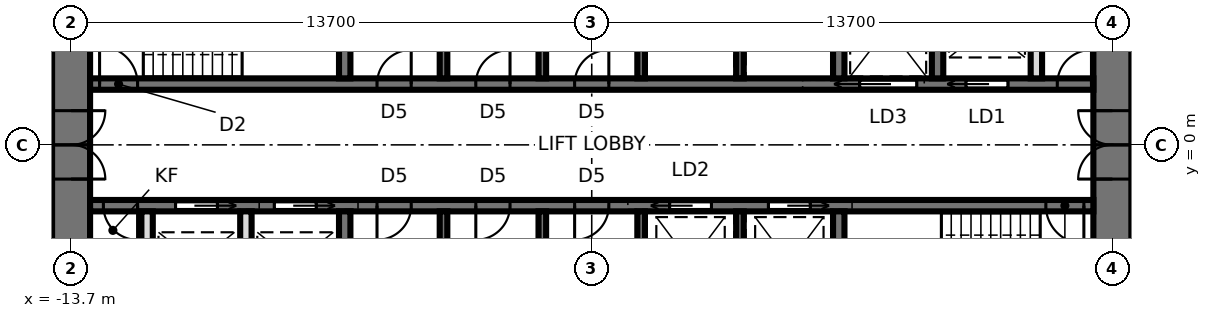
"""IFC4 building model, lengths in metres.
Left out: names, types, materials, properties, quantities, classifications, styles, units other than length and angle.
Written with IfcOpenShell. Run it as: python <this file> out.ifc"""

import sys

from ifc_helpers import new_model, si_unit, direction, frame, frame_2d, origin, place, context, subcontext, project, spatial, rectangle, extrude, element, fill, save


model = new_model("IFC4")
c1 = context("Model", 3, precision=1e-05, world=origin(), true_north=direction((0.0, 1.0)))
c2 = subcontext(c1, "Body", "Model", "MODEL_VIEW")
j1 = project(units=[si_unit("LENGTHUNIT", "METRE"), si_unit("PLANEANGLEUNIT", "RADIAN")], contexts=[c1])
p1 = place(None, origin())
s1 = spatial("IfcSite", under=j1, at=p1, CompositionType="ELEMENT")
p2 = place(p1, origin())
s2 = spatial("IfcBuilding", under=s1, at=p2, CompositionType="ELEMENT")
p3 = place(p2, frame((0.0, 0.0, 195.5)))
s3 = spatial("IfcBuildingStorey", under=s2, at=p3, CompositionType="ELEMENT", Elevation=195.5)
p4 = place(p3, frame((13.7, -9.5, 0.0), z_axis=(0.0, 0.0, 1.0), x_axis=(0.0, 1.0, 0.0)))
e1 = element("IfcWall", 1, at=p4, inside=s3, PredefinedType="SHEAR", context=c2, shape_type="SweptSolid", body=[
    extrude(rectangle(XDim=19.0, YDim=1.0, at=frame_2d((9.5, 0.0))), origin(), (0.0, 0.0, 1.0), 3.9),
])
p5 = place(p4, frame((8.6, 0.0, 0.0)))
e2 = element("IfcOpeningElement", 2, at=p5, cuts=e1, PredefinedType="OPENING", context=c2, shape_type="SweptSolid", body=[
    extrude(rectangle(XDim=1.8, YDim=2.4, at=frame_2d((0.9, 1.2))), frame((0.0, 0.51, 0.0), z_axis=(0.0, -1.0, 0.0), x_axis=(1.0, 0.0, 0.0)), (0.0, 0.0, 1.0), 1.02),
])
p6 = place(p3, frame((-13.7, 9.5, 0.0), z_axis=(0.0, 0.0, 1.0), x_axis=(0.0, -1.0, 0.0)))
e3 = element("IfcWall", 3, at=p6, inside=s3, PredefinedType="SHEAR", context=c2, shape_type="SweptSolid", body=[
    extrude(rectangle(XDim=19.0, YDim=1.0, at=frame_2d((9.5, 0.0))), origin(), (0.0, 0.0, 1.0), 3.9),
])
p7 = place(p6, frame((8.6, 0.0, 0.0)))
e4 = element("IfcOpeningElement", 4, at=p7, cuts=e3, PredefinedType="OPENING", context=c2, shape_type="SweptSolid", body=[
    extrude(rectangle(XDim=1.8, YDim=2.4, at=frame_2d((0.9, 1.2))), frame((0.0, 0.51, 0.0), z_axis=(0.0, -1.0, 0.0), x_axis=(1.0, 0.0, 0.0)), (0.0, 0.0, 1.0), 1.02),
])
p8 = place(p3, frame((-13.2, 1.6, 0.0), z_axis=(0.0, 0.0, 1.0), x_axis=(1.0, 0.0, 0.0)))
e5 = element("IfcWall", 5, at=p8, inside=s3, PredefinedType="SHEAR", context=c2, shape_type="SweptSolid", body=[
    extrude(rectangle(XDim=26.4, YDim=0.3, at=frame_2d((13.2, 0.0))), origin(), (0.0, 0.0, 1.0), 3.9),
])
p9 = place(p8, frame((0.25, 0.0, 0.0)))
e6 = element("IfcOpeningElement", 6, at=p9, cuts=e5, PredefinedType="OPENING", context=c2, shape_type="SweptSolid", body=[
    extrude(rectangle(XDim=1.0, YDim=2.1, at=frame_2d((0.5, 1.05))), frame((0.0, 0.16, 0.0), z_axis=(0.0, -1.0, 0.0), x_axis=(1.0, 0.0, 0.0)), (0.0, 0.0, 1.0), 0.32),
])
p10 = place(p8, frame((23.05, 0.0, 0.0)))
e7 = element("IfcOpeningElement", 7, at=p10, cuts=e5, PredefinedType="OPENING", context=c2, shape_type="SweptSolid", body=[
    extrude(rectangle(XDim=1.1, YDim=2.3, at=frame_2d((0.55, 1.15))), frame((0.0, 0.16, 0.0), z_axis=(0.0, -1.0, 0.0), x_axis=(1.0, 0.0, 0.0)), (0.0, 0.0, 1.0), 0.32),
])
p11 = place(p8, frame((20.25, 0.0, 0.0)))
e8 = element("IfcOpeningElement", 8, at=p11, cuts=e5, PredefinedType="OPENING", context=c2, shape_type="SweptSolid", body=[
    extrude(rectangle(XDim=1.5, YDim=2.4, at=frame_2d((0.75, 1.2))), frame((0.0, 0.16, 0.0), z_axis=(0.0, -1.0, 0.0), x_axis=(1.0, 0.0, 0.0)), (0.0, 0.0, 1.0), 0.32),
])
p12 = place(p8, frame((7.55, 0.0, 0.0)))
e9 = element("IfcOpeningElement", 9, at=p12, cuts=e5, PredefinedType="OPENING", context=c2, shape_type="SweptSolid", body=[
    extrude(rectangle(XDim=0.9, YDim=2.1, at=frame_2d((0.45, 1.05))), frame((0.0, 0.16, 0.0), z_axis=(0.0, -1.0, 0.0), x_axis=(1.0, 0.0, 0.0)), (0.0, 0.0, 1.0), 0.32),
])
p13 = place(p8, frame((10.15, 0.0, 0.0)))
e10 = element("IfcOpeningElement", 10, at=p13, cuts=e5, PredefinedType="OPENING", context=c2, shape_type="SweptSolid", body=[
    extrude(rectangle(XDim=0.9, YDim=2.1, at=frame_2d((0.45, 1.05))), frame((0.0, 0.16, 0.0), z_axis=(0.0, -1.0, 0.0), x_axis=(1.0, 0.0, 0.0)), (0.0, 0.0, 1.0), 0.32),
])
p14 = place(p8, frame((12.75, 0.0, 0.0)))
e11 = element("IfcOpeningElement", 11, at=p14, cuts=e5, PredefinedType="OPENING", context=c2, shape_type="SweptSolid", body=[
    extrude(rectangle(XDim=0.9, YDim=2.1, at=frame_2d((0.45, 1.05))), frame((0.0, 0.16, 0.0), z_axis=(0.0, -1.0, 0.0), x_axis=(1.0, 0.0, 0.0)), (0.0, 0.0, 1.0), 0.32),
])
p15 = place(p8, frame((25.45, 0.0, 0.0)))
e12 = element("IfcOpeningElement", 12, at=p15, cuts=e5, PredefinedType="OPENING", context=c2, shape_type="SweptSolid", body=[
    extrude(rectangle(XDim=0.9, YDim=2.1, at=frame_2d((0.45, 1.05))), frame((0.0, 0.16, 0.0), z_axis=(0.0, -1.0, 0.0), x_axis=(1.0, 0.0, 0.0)), (0.0, 0.0, 1.0), 0.32),
])
p16 = place(p3, frame((-13.2, -1.6, 0.0), z_axis=(0.0, 0.0, 1.0), x_axis=(1.0, 0.0, 0.0)))
e13 = element("IfcWall", 13, at=p16, inside=s3, PredefinedType="SHEAR", context=c2, shape_type="SweptSolid", body=[
    extrude(rectangle(XDim=26.4, YDim=0.3, at=frame_2d((13.2, 0.0))), origin(), (0.0, 0.0, 1.0), 3.9),
])
p17 = place(p16, frame((25.15, 0.0, 0.0)))
e14 = element("IfcOpeningElement", 14, at=p17, cuts=e13, PredefinedType="OPENING", context=c2, shape_type="SweptSolid", body=[
    extrude(rectangle(XDim=1.0, YDim=2.1, at=frame_2d((0.5, 1.05))), frame((0.0, 0.16, 0.0), z_axis=(0.0, -1.0, 0.0), x_axis=(1.0, 0.0, 0.0)), (0.0, 0.0, 1.0), 0.32),
])
p18 = place(p16, frame((7.55, 0.0, 0.0)))
e15 = element("IfcOpeningElement", 15, at=p18, cuts=e13, PredefinedType="OPENING", context=c2, shape_type="SweptSolid", body=[
    extrude(rectangle(XDim=0.9, YDim=2.1, at=frame_2d((0.45, 1.05))), frame((0.0, 0.16, 0.0), z_axis=(0.0, -1.0, 0.0), x_axis=(1.0, 0.0, 0.0)), (0.0, 0.0, 1.0), 0.32),
])
p19 = place(p16, frame((10.15, 0.0, 0.0)))
e16 = element("IfcOpeningElement", 16, at=p19, cuts=e13, PredefinedType="OPENING", context=c2, shape_type="SweptSolid", body=[
    extrude(rectangle(XDim=0.9, YDim=2.1, at=frame_2d((0.45, 1.05))), frame((0.0, 0.16, 0.0), z_axis=(0.0, -1.0, 0.0), x_axis=(1.0, 0.0, 0.0)), (0.0, 0.0, 1.0), 0.32),
])
p20 = place(p16, frame((12.75, 0.0, 0.0)))
e17 = element("IfcOpeningElement", 17, at=p20, cuts=e13, PredefinedType="OPENING", context=c2, shape_type="SweptSolid", body=[
    extrude(rectangle(XDim=0.9, YDim=2.1, at=frame_2d((0.45, 1.05))), frame((0.0, 0.16, 0.0), z_axis=(0.0, -1.0, 0.0), x_axis=(1.0, 0.0, 0.0)), (0.0, 0.0, 1.0), 0.32),
])
p21 = place(p16, frame((15.25, 0.0, 0.0)))
e18 = element("IfcOpeningElement", 18, at=p21, cuts=e13, PredefinedType="OPENING", context=c2, shape_type="SweptSolid", body=[
    extrude(rectangle(XDim=1.1, YDim=2.3, at=frame_2d((0.55, 1.15))), frame((0.0, 0.16, 0.0), z_axis=(0.0, -1.0, 0.0), x_axis=(1.0, 0.0, 0.0)), (0.0, 0.0, 1.0), 0.32),
])
p22 = place(p16, frame((17.85, 0.0, 0.0)))
e19 = element("IfcOpeningElement", 19, at=p22, cuts=e13, PredefinedType="OPENING", context=c2, shape_type="SweptSolid", body=[
    extrude(rectangle(XDim=1.1, YDim=2.3, at=frame_2d((0.55, 1.15))), frame((0.0, 0.16, 0.0), z_axis=(0.0, -1.0, 0.0), x_axis=(1.0, 0.0, 0.0)), (0.0, 0.0, 1.0), 0.32),
])
p23 = place(p16, frame((4.85, 0.0, 0.0)))
e20 = element("IfcOpeningElement", 20, at=p23, cuts=e13, PredefinedType="OPENING", context=c2, shape_type="SweptSolid", body=[
    extrude(rectangle(XDim=1.1, YDim=2.3, at=frame_2d((0.55, 1.15))), frame((0.0, 0.16, 0.0), z_axis=(0.0, -1.0, 0.0), x_axis=(1.0, 0.0, 0.0)), (0.0, 0.0, 1.0), 0.32),
])
p24 = place(p16, frame((2.25, 0.0, 0.0)))
e21 = element("IfcOpeningElement", 21, at=p24, cuts=e13, PredefinedType="OPENING", context=c2, shape_type="SweptSolid", body=[
    extrude(rectangle(XDim=1.1, YDim=2.3, at=frame_2d((0.55, 1.15))), frame((0.0, 0.16, 0.0), z_axis=(0.0, -1.0, 0.0), x_axis=(1.0, 0.0, 0.0)), (0.0, 0.0, 1.0), 0.32),
])
p25 = place(p16, frame((0.35, 0.0, 0.0)))
e22 = element("IfcOpeningElement", 22, at=p25, cuts=e13, PredefinedType="OPENING", context=c2, shape_type="SweptSolid", body=[
    extrude(rectangle(XDim=0.9, YDim=2.1, at=frame_2d((0.45, 1.05))), frame((0.0, 0.16, 0.0), z_axis=(0.0, -1.0, 0.0), x_axis=(1.0, 0.0, 0.0)), (0.0, 0.0, 1.0), 0.32),
])
for number, where, z_axis, x_axis in (
    (23, (-6.5, 1.75, 0.0), (0.0, 0.0, 1.0), (0.0, 1.0, 0.0)),
    (24, (6.5, 1.75, 0.0), (0.0, 0.0, 1.0), (0.0, 1.0, 0.0)),
):
    element("IfcWall", number, at=place(p3, frame(where, z_axis=z_axis, x_axis=x_axis)), inside=s3, PredefinedType="SHEAR", context=c2, shape_type="SweptSolid", body=[
        extrude(rectangle(XDim=2.7, YDim=0.3, at=frame_2d((1.35, 0.0))), origin(), (0.0, 0.0, 1.0), 3.9),
    ])
for number, where, z_axis, x_axis in (
    (25, (-3.9, 1.75, 0.0), (0.0, 0.0, 1.0), (0.0, 1.0, 0.0)),
    (26, (-1.3, 1.75, 0.0), (0.0, 0.0, 1.0), (0.0, 1.0, 0.0)),
    (27, (1.3, 1.75, 0.0), (0.0, 0.0, 1.0), (0.0, 1.0, 0.0)),
    (28, (3.9, 1.75, 0.0), (0.0, 0.0, 1.0), (0.0, 1.0, 0.0)),
):
    element("IfcWall", number, at=place(p3, frame(where, z_axis=z_axis, x_axis=x_axis)), inside=s3, PredefinedType="SHEAR", context=c2, shape_type="SweptSolid", body=[
        extrude(rectangle(XDim=2.7, YDim=0.2, at=frame_2d((1.35, 0.0))), origin(), (0.0, 0.0, 1.0), 3.9),
    ])
for number, where, z_axis, x_axis in (
    (29, (-6.5, -1.75, 0.0), (0.0, 0.0, 1.0), (0.0, -1.0, 0.0)),
    (30, (6.5, -1.75, 0.0), (0.0, 0.0, 1.0), (0.0, -1.0, 0.0)),
):
    element("IfcWall", number, at=place(p3, frame(where, z_axis=z_axis, x_axis=x_axis)), inside=s3, PredefinedType="SHEAR", context=c2, shape_type="SweptSolid", body=[
        extrude(rectangle(XDim=2.7, YDim=0.3, at=frame_2d((1.35, 0.0))), origin(), (0.0, 0.0, 1.0), 3.9),
    ])
for number, where, z_axis, x_axis in (
    (31, (-3.9, -1.75, 0.0), (0.0, 0.0, 1.0), (0.0, -1.0, 0.0)),
    (32, (-1.3, -1.75, 0.0), (0.0, 0.0, 1.0), (0.0, -1.0, 0.0)),
    (33, (1.3, -1.75, 0.0), (0.0, 0.0, 1.0), (0.0, -1.0, 0.0)),
    (34, (3.9, -1.75, 0.0), (0.0, 0.0, 1.0), (0.0, -1.0, 0.0)),
):
    element("IfcWall", number, at=place(p3, frame(where, z_axis=z_axis, x_axis=x_axis)), inside=s3, PredefinedType="SHEAR", context=c2, shape_type="SweptSolid", body=[
        extrude(rectangle(XDim=2.7, YDim=0.2, at=frame_2d((1.35, 0.0))), origin(), (0.0, 0.0, 1.0), 3.9),
    ])
p26 = place(p3, frame((9.1, 1.75, 0.0), z_axis=(0.0, 0.0, 1.0), x_axis=(0.0, 1.0, 0.0)))
e35 = element("IfcWall", 35, at=p26, inside=s3, PredefinedType="SHEAR", context=c2, shape_type="SweptSolid", body=[
    extrude(rectangle(XDim=2.7, YDim=0.3, at=frame_2d((1.35, 0.0))), origin(), (0.0, 0.0, 1.0), 3.9),
])
for number, where, z_axis, x_axis in (
    (36, (-9.1, -1.75, 0.0), (0.0, 0.0, 1.0), (0.0, -1.0, 0.0)),
    (37, (-11.7, -1.75, 0.0), (0.0, 0.0, 1.0), (0.0, -1.0, 0.0)),
    (38, (11.7, 1.75, 0.0), (0.0, 0.0, 1.0), (0.0, 1.0, 0.0)),
):
    element("IfcWall", number, at=place(p3, frame(where, z_axis=z_axis, x_axis=x_axis)), inside=s3, PredefinedType="SOLIDWALL", context=c2, shape_type="SweptSolid", body=[
        extrude(rectangle(XDim=2.7, YDim=0.3, at=frame_2d((1.35, 0.0))), origin(), (0.0, 0.0, 1.0), 3.74),
    ])
p27 = place(p7, origin())
e39 = element("IfcDoor", 39, at=p27, inside=s3, OperationType="DOUBLE_DOOR_SINGLE_SWING", PredefinedType="DOOR", context=c2, shape_type="SweptSolid", body=[
    extrude(rectangle(XDim=1.72, YDim=2.36, at=frame_2d((0.9, 1.18))), frame((0.0, 0.025, 0.0), z_axis=(0.0, -1.0, 0.0), x_axis=(1.0, 0.0, 0.0)), (0.0, 0.0, 1.0), 0.05),
    extrude(rectangle(XDim=0.04, YDim=2.4, at=frame_2d((0.02, 1.2))), frame((0.0, 0.25, 0.0), z_axis=(0.0, -1.0, 0.0), x_axis=(1.0, 0.0, 0.0)), (0.0, 0.0, 1.0), 0.5),
    extrude(rectangle(XDim=0.04, YDim=2.4, at=frame_2d((1.78, 1.2))), frame((0.0, 0.25, 0.0), z_axis=(0.0, -1.0, 0.0), x_axis=(1.0, 0.0, 0.0)), (0.0, 0.0, 1.0), 0.5),
    extrude(rectangle(XDim=1.72, YDim=0.04, at=frame_2d((0.9, 2.38))), frame((0.0, 0.25, 0.0), z_axis=(0.0, -1.0, 0.0), x_axis=(1.0, 0.0, 0.0)), (0.0, 0.0, 1.0), 0.5),
])
fill(e4, e39)
p28 = place(p5, origin())
e40 = element("IfcDoor", 40, at=p28, inside=s3, OperationType="DOUBLE_DOOR_SINGLE_SWING", PredefinedType="DOOR", context=c2, shape_type="SweptSolid", body=[
    extrude(rectangle(XDim=1.72, YDim=2.36, at=frame_2d((0.9, 1.18))), frame((0.0, 0.025, 0.0), z_axis=(0.0, -1.0, 0.0), x_axis=(1.0, 0.0, 0.0)), (0.0, 0.0, 1.0), 0.05),
    extrude(rectangle(XDim=0.04, YDim=2.4, at=frame_2d((0.02, 1.2))), frame((0.0, 0.25, 0.0), z_axis=(0.0, -1.0, 0.0), x_axis=(1.0, 0.0, 0.0)), (0.0, 0.0, 1.0), 0.5),
    extrude(rectangle(XDim=0.04, YDim=2.4, at=frame_2d((1.78, 1.2))), frame((0.0, 0.25, 0.0), z_axis=(0.0, -1.0, 0.0), x_axis=(1.0, 0.0, 0.0)), (0.0, 0.0, 1.0), 0.5),
    extrude(rectangle(XDim=1.72, YDim=0.04, at=frame_2d((0.9, 2.38))), frame((0.0, 0.25, 0.0), z_axis=(0.0, -1.0, 0.0), x_axis=(1.0, 0.0, 0.0)), (0.0, 0.0, 1.0), 0.5),
])
fill(e2, e40)
p29 = place(p9, origin())
e41 = element("IfcDoor", 41, at=p29, inside=s3, OperationType="SINGLE_SWING_LEFT", PredefinedType="DOOR", context=c2, shape_type="SweptSolid", body=[
    extrude(rectangle(XDim=1.0, YDim=2.1, at=frame_2d((0.5, 1.05))), frame((0.0, 0.025, 0.0), z_axis=(0.0, -1.0, 0.0), x_axis=(1.0, 0.0, 0.0)), (0.0, 0.0, 1.0), 0.05),
])
fill(e6, e41)
p30 = place(p17, frame((1.0, 0.0, 0.0), z_axis=(0.0, 0.0, 1.0), x_axis=(-1.0, 0.0, 0.0)))
e42 = element("IfcDoor", 42, at=p30, inside=s3, OperationType="SINGLE_SWING_LEFT", PredefinedType="DOOR", context=c2, shape_type="SweptSolid", body=[
    extrude(rectangle(XDim=1.0, YDim=2.1, at=frame_2d((0.5, 1.05))), frame((0.0, 0.025, 0.0), z_axis=(0.0, -1.0, 0.0), x_axis=(1.0, 0.0, 0.0)), (0.0, 0.0, 1.0), 0.05),
])
fill(e14, e42)
p31 = place(p10, origin())
e43 = element("IfcDoor", 43, at=p31, inside=s3, OperationType="SLIDING_TO_LEFT", PredefinedType="DOOR", context=c2, shape_type="SweptSolid", body=[
    extrude(rectangle(XDim=1.1, YDim=2.3, at=frame_2d((0.55, 1.15))), frame((0.0, 0.025, 0.0), z_axis=(0.0, -1.0, 0.0), x_axis=(1.0, 0.0, 0.0)), (0.0, 0.0, 1.0), 0.05),
])
fill(e7, e43)
p32 = place(p11, origin())
e44 = element("IfcDoor", 44, at=p32, inside=s3, OperationType="SLIDING_TO_LEFT", PredefinedType="DOOR", context=c2, shape_type="SweptSolid", body=[
    extrude(rectangle(XDim=1.5, YDim=2.4, at=frame_2d((0.75, 1.2))), frame((0.0, 0.025, 0.0), z_axis=(0.0, -1.0, 0.0), x_axis=(1.0, 0.0, 0.0)), (0.0, 0.0, 1.0), 0.05),
])
fill(e8, e44)
p33 = place(p12, origin())
e45 = element("IfcDoor", 45, at=p33, inside=s3, OperationType="SINGLE_SWING_RIGHT", PredefinedType="DOOR", context=c2, shape_type="SweptSolid", body=[
    extrude(rectangle(XDim=0.9, YDim=2.1, at=frame_2d((0.45, 1.05))), frame((0.0, 0.025, 0.0), z_axis=(0.0, -1.0, 0.0), x_axis=(1.0, 0.0, 0.0)), (0.0, 0.0, 1.0), 0.05),
])
fill(e9, e45)
p34 = place(p13, origin())
e46 = element("IfcDoor", 46, at=p34, inside=s3, OperationType="SINGLE_SWING_RIGHT", PredefinedType="DOOR", context=c2, shape_type="SweptSolid", body=[
    extrude(rectangle(XDim=0.9, YDim=2.1, at=frame_2d((0.45, 1.05))), frame((0.0, 0.025, 0.0), z_axis=(0.0, -1.0, 0.0), x_axis=(1.0, 0.0, 0.0)), (0.0, 0.0, 1.0), 0.05),
])
fill(e10, e46)
p35 = place(p14, origin())
e47 = element("IfcDoor", 47, at=p35, inside=s3, OperationType="SINGLE_SWING_RIGHT", PredefinedType="DOOR", context=c2, shape_type="SweptSolid", body=[
    extrude(rectangle(XDim=0.9, YDim=2.1, at=frame_2d((0.45, 1.05))), frame((0.0, 0.025, 0.0), z_axis=(0.0, -1.0, 0.0), x_axis=(1.0, 0.0, 0.0)), (0.0, 0.0, 1.0), 0.05),
])
fill(e11, e47)
p36 = place(p18, frame((0.9, 0.0, 0.0), z_axis=(0.0, 0.0, 1.0), x_axis=(-1.0, 0.0, 0.0)))
e48 = element("IfcDoor", 48, at=p36, inside=s3, OperationType="SINGLE_SWING_RIGHT", PredefinedType="DOOR", context=c2, shape_type="SweptSolid", body=[
    extrude(rectangle(XDim=0.9, YDim=2.1, at=frame_2d((0.45, 1.05))), frame((0.0, 0.025, 0.0), z_axis=(0.0, -1.0, 0.0), x_axis=(1.0, 0.0, 0.0)), (0.0, 0.0, 1.0), 0.05),
])
fill(e15, e48)
p37 = place(p19, frame((0.9, 0.0, 0.0), z_axis=(0.0, 0.0, 1.0), x_axis=(-1.0, 0.0, 0.0)))
e49 = element("IfcDoor", 49, at=p37, inside=s3, OperationType="SINGLE_SWING_RIGHT", PredefinedType="DOOR", context=c2, shape_type="SweptSolid", body=[
    extrude(rectangle(XDim=0.9, YDim=2.1, at=frame_2d((0.45, 1.05))), frame((0.0, 0.025, 0.0), z_axis=(0.0, -1.0, 0.0), x_axis=(1.0, 0.0, 0.0)), (0.0, 0.0, 1.0), 0.05),
])
fill(e16, e49)
p38 = place(p20, frame((0.9, 0.0, 0.0), z_axis=(0.0, 0.0, 1.0), x_axis=(-1.0, 0.0, 0.0)))
e50 = element("IfcDoor", 50, at=p38, inside=s3, OperationType="SINGLE_SWING_RIGHT", PredefinedType="DOOR", context=c2, shape_type="SweptSolid", body=[
    extrude(rectangle(XDim=0.9, YDim=2.1, at=frame_2d((0.45, 1.05))), frame((0.0, 0.025, 0.0), z_axis=(0.0, -1.0, 0.0), x_axis=(1.0, 0.0, 0.0)), (0.0, 0.0, 1.0), 0.05),
])
fill(e17, e50)
p39 = place(p21, frame((1.1, 0.0, 0.0), z_axis=(0.0, 0.0, 1.0), x_axis=(-1.0, 0.0, 0.0)))
e51 = element("IfcDoor", 51, at=p39, inside=s3, OperationType="SLIDING_TO_RIGHT", PredefinedType="DOOR", context=c2, shape_type="SweptSolid", body=[
    extrude(rectangle(XDim=1.1, YDim=2.3, at=frame_2d((0.55, 1.15))), frame((0.0, 0.025, 0.0), z_axis=(0.0, -1.0, 0.0), x_axis=(1.0, 0.0, 0.0)), (0.0, 0.0, 1.0), 0.05),
])
fill(e18, e51)
p40 = place(p22, frame((1.1, 0.0, 0.0), z_axis=(0.0, 0.0, 1.0), x_axis=(-1.0, 0.0, 0.0)))
e52 = element("IfcDoor", 52, at=p40, inside=s3, OperationType="SLIDING_TO_LEFT", PredefinedType="DOOR", context=c2, shape_type="SweptSolid", body=[
    extrude(rectangle(XDim=1.1, YDim=2.3, at=frame_2d((0.55, 1.15))), frame((0.0, 0.025, 0.0), z_axis=(0.0, -1.0, 0.0), x_axis=(1.0, 0.0, 0.0)), (0.0, 0.0, 1.0), 0.05),
])
fill(e19, e52)
p41 = place(p23, frame((1.1, 0.0, 0.0), z_axis=(0.0, 0.0, 1.0), x_axis=(-1.0, 0.0, 0.0)))
e53 = element("IfcDoor", 53, at=p41, inside=s3, OperationType="SLIDING_TO_LEFT", PredefinedType="DOOR", context=c2, shape_type="SweptSolid", body=[
    extrude(rectangle(XDim=1.1, YDim=2.3, at=frame_2d((0.55, 1.15))), frame((0.0, 0.025, 0.0), z_axis=(0.0, -1.0, 0.0), x_axis=(1.0, 0.0, 0.0)), (0.0, 0.0, 1.0), 0.05),
])
fill(e20, e53)
p42 = place(p24, frame((1.1, 0.0, 0.0), z_axis=(0.0, 0.0, 1.0), x_axis=(-1.0, 0.0, 0.0)))
e54 = element("IfcDoor", 54, at=p42, inside=s3, OperationType="SLIDING_TO_LEFT", PredefinedType="DOOR", context=c2, shape_type="SweptSolid", body=[
    extrude(rectangle(XDim=1.1, YDim=2.3, at=frame_2d((0.55, 1.15))), frame((0.0, 0.025, 0.0), z_axis=(0.0, -1.0, 0.0), x_axis=(1.0, 0.0, 0.0)), (0.0, 0.0, 1.0), 0.05),
])
fill(e21, e54)
p43 = place(p15, origin())
e55 = element("IfcDoor", 55, at=p43, inside=s3, OperationType="SINGLE_SWING_RIGHT", PredefinedType="DOOR", context=c2, shape_type="SweptSolid", body=[
    extrude(rectangle(XDim=0.9, YDim=2.1, at=frame_2d((0.45, 1.05))), frame((0.0, 0.025, 0.0), z_axis=(0.0, -1.0, 0.0), x_axis=(1.0, 0.0, 0.0)), (0.0, 0.0, 1.0), 0.05),
])
fill(e12, e55)
p44 = place(p25, frame((0.9, 0.0, 0.0), z_axis=(0.0, 0.0, 1.0), x_axis=(-1.0, 0.0, 0.0)))
e56 = element("IfcDoor", 56, at=p44, inside=s3, OperationType="SINGLE_SWING_LEFT", PredefinedType="DOOR", context=c2, shape_type="SweptSolid", body=[
    extrude(rectangle(XDim=0.9, YDim=2.1, at=frame_2d((0.45, 1.05))), frame((0.0, 0.025, 0.0), z_axis=(0.0, -1.0, 0.0), x_axis=(1.0, 0.0, 0.0)), (0.0, 0.0, 1.0), 0.05),
])
fill(e22, e56)
save(model, sys.argv[1])
